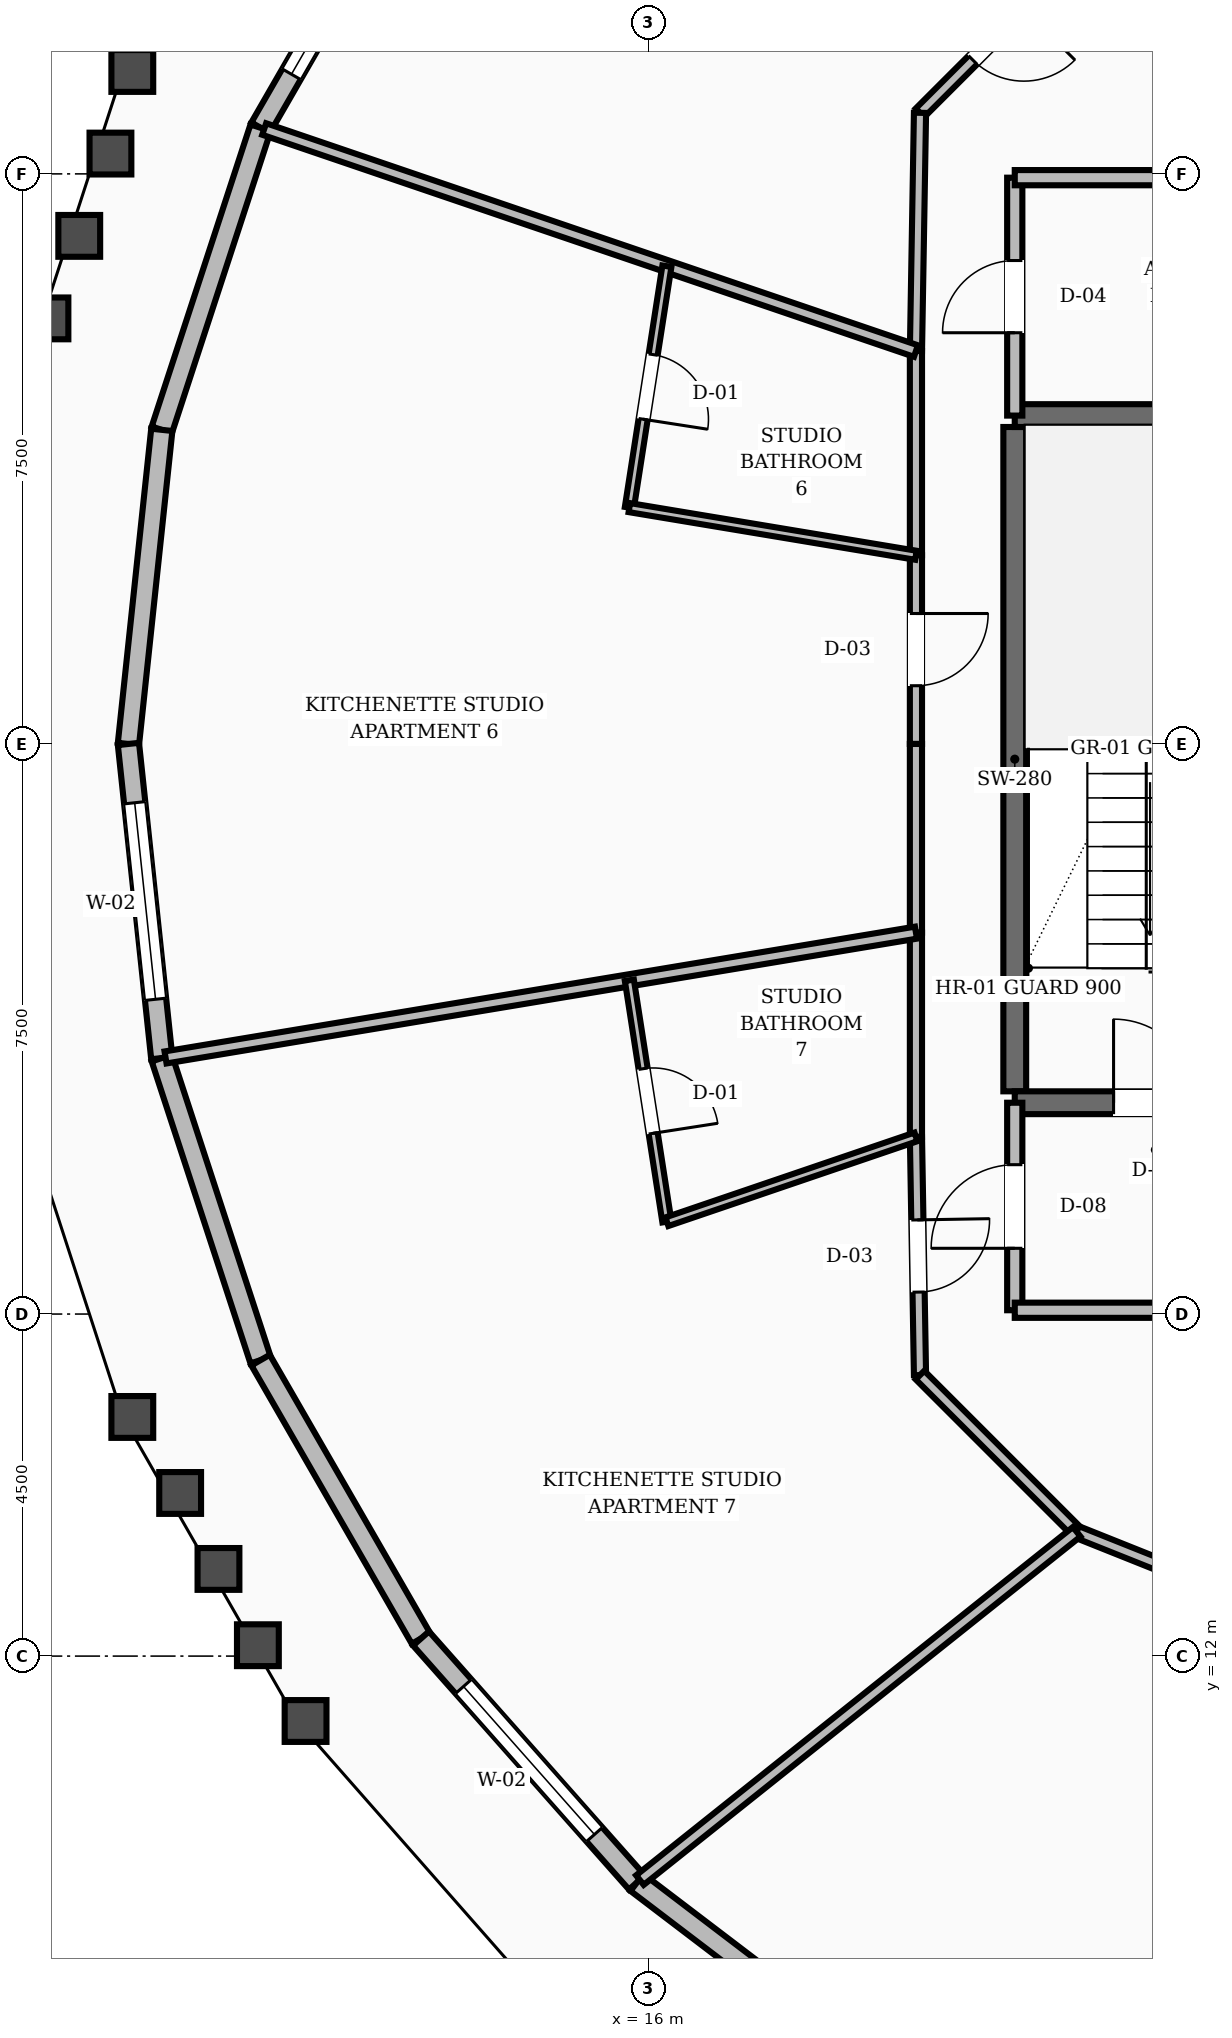
"""IFC4 building model, lengths in metres.
Left out: names, types, materials, properties, quantities, classifications, styles, units other than length and angle.
Written with IfcOpenShell. Run it as: python <this file> out.ifc"""

import sys

from ifc_helpers import new_model, si_unit, direction, frame, frame_2d, origin, place, context, subcontext, project, spatial, rectangle, extrude, element, fill, save


model = new_model("IFC4")
c1 = context("Model", 3, precision=1e-05, world=origin(), true_north=direction((0.0, 1.0)))
c2 = subcontext(c1, "Body", "Model", "MODEL_VIEW")
j1 = project(units=[si_unit("LENGTHUNIT", "METRE"), si_unit("PLANEANGLEUNIT", "RADIAN")], contexts=[c1])
p1 = place(None, origin())
s1 = spatial("IfcSite", under=j1, at=p1, CompositionType="ELEMENT")
p2 = place(p1, origin())
s2 = spatial("IfcBuilding", under=s1, at=p2, CompositionType="ELEMENT")
p3 = place(p2, frame((0.0, 0.0, 225.6)))
s3 = spatial("IfcBuildingStorey", under=s2, at=p3, CompositionType="ELEMENT", Elevation=225.6)
p4 = place(p3, frame((20.82, 19.43, 0.0), z_axis=(0.0, 0.0, 1.0), x_axis=(0.0, 1.0, 0.0)))
e1 = element("IfcWall", 1, at=p4, inside=s3, PredefinedType="SHEAR", context=c2, shape_type="SweptSolid", body=[
    extrude(rectangle(XDim=8.74, YDim=0.3, at=frame_2d((4.37, 0.0))), origin(), (0.0, 0.0, 1.0), 3.6),
])
p5 = place(p3, frame((20.82, 19.28, 0.0), z_axis=(0.0, 0.0, 1.0), x_axis=(1.0, 0.0, 0.0)))
e2 = element("IfcWall", 2, at=p5, inside=s3, PredefinedType="SHEAR", context=c2, shape_type="SweptSolid", body=[
    extrude(rectangle(XDim=3.6, YDim=0.3, at=frame_2d((1.8, 0.0))), origin(), (0.0, 0.0, 1.0), 3.6),
])
p6 = place(p5, frame((1.3, 0.0, 0.0)))
e3 = element("IfcOpeningElement", 3, at=p6, cuts=e2, PredefinedType="OPENING", context=c2, shape_type="SweptSolid", body=[
    extrude(rectangle(XDim=1.1, YDim=2.1, at=frame_2d((0.55, 1.05))), frame((0.0, 0.16, 0.0), z_axis=(0.0, -1.0, 0.0), x_axis=(1.0, 0.0, 0.0)), (0.0, 0.0, 1.0), 0.32),
])
p7 = place(p3, frame((20.82, 28.32, 0.0), z_axis=(0.0, 0.0, 1.0), x_axis=(1.0, 0.0, 0.0)))
e4 = element("IfcWall", 4, at=p7, inside=s3, PredefinedType="SHEAR", context=c2, shape_type="SweptSolid", body=[
    extrude(rectangle(XDim=3.6, YDim=0.3, at=frame_2d((1.8, 0.0))), origin(), (0.0, 0.0, 1.0), 3.6),
])
p8 = place(p3, frame((13.009, 35.768, 0.0), z_axis=(0.0, 0.0, 1.0), x_axis=(-0.499382401046, -0.866381681204, 0.0)))
e5 = element("IfcWall", 5, at=p8, inside=s3, PredefinedType="STANDARD", context=c2, shape_type="SweptSolid", body=[
    extrude(rectangle(XDim=4.227, YDim=0.28, at=frame_2d((2.113, 0.0))), origin(), (0.0, 0.0, 1.0), 2.88),
])
p9 = place(p8, frame((0.813, 0.0, 0.8)))
e6 = element("IfcOpeningElement", 6, at=p9, cuts=e5, PredefinedType="OPENING", context=c2, shape_type="SweptSolid", body=[
    extrude(rectangle(XDim=2.6, YDim=1.65, at=frame_2d((1.3, 0.825))), frame((0.0, 0.15, 0.0), z_axis=(0.0, -1.0, 0.0), x_axis=(1.0, 0.0, 0.0)), (0.0, 0.0, 1.0), 0.3),
])
p10 = place(p3, frame((10.898, 32.106, 0.0), z_axis=(0.0, 0.0, 1.0), x_axis=(-0.310844369952, -0.950460823848, 0.0)))
e7 = element("IfcWall", 7, at=p10, inside=s3, PredefinedType="STANDARD", context=c2, shape_type="SweptSolid", body=[
    extrude(rectangle(XDim=4.181, YDim=0.28, at=frame_2d((2.09, 0.0))), origin(), (0.0, 0.0, 1.0), 2.88),
])
p11 = place(p3, frame((9.598, 28.133, 0.0), z_axis=(0.0, 0.0, 1.0), x_axis=(-0.105626616613, -0.99440586174, 0.0)))
e8 = element("IfcWall", 8, at=p11, inside=s3, PredefinedType="STANDARD", context=c2, shape_type="SweptSolid", body=[
    extrude(rectangle(XDim=4.156, YDim=0.28, at=frame_2d((2.078, 0.0))), origin(), (0.0, 0.0, 1.0), 2.88),
])
p12 = place(p3, frame((9.159, 24.0, 0.0), z_axis=(0.0, 0.0, 1.0), x_axis=(0.105626616613, -0.99440586174, 0.0)))
e9 = element("IfcWall", 9, at=p12, inside=s3, PredefinedType="STANDARD", context=c2, shape_type="SweptSolid", body=[
    extrude(rectangle(XDim=4.156, YDim=0.28, at=frame_2d((2.078, 0.0))), origin(), (0.0, 0.0, 1.0), 2.88),
])
p13 = place(p12, frame((0.778, 0.0, 0.8)))
e10 = element("IfcOpeningElement", 10, at=p13, cuts=e9, PredefinedType="OPENING", context=c2, shape_type="SweptSolid", body=[
    extrude(rectangle(XDim=2.6, YDim=1.65, at=frame_2d((1.3, 0.825))), frame((0.0, 0.15, 0.0), z_axis=(0.0, -1.0, 0.0), x_axis=(1.0, 0.0, 0.0)), (0.0, 0.0, 1.0), 0.3),
])
p14 = place(p3, frame((9.598, 19.867, 0.0), z_axis=(0.0, 0.0, 1.0), x_axis=(0.310844369952, -0.950460823848, 0.0)))
e11 = element("IfcWall", 11, at=p14, inside=s3, PredefinedType="STANDARD", context=c2, shape_type="SweptSolid", body=[
    extrude(rectangle(XDim=4.181, YDim=0.28, at=frame_2d((2.09, 0.0))), origin(), (0.0, 0.0, 1.0), 2.88),
])
p15 = place(p3, frame((10.898, 15.894, 0.0), z_axis=(0.0, 0.0, 1.0), x_axis=(0.499382401046, -0.866381681204, 0.0)))
e12 = element("IfcWall", 12, at=p15, inside=s3, PredefinedType="STANDARD", context=c2, shape_type="SweptSolid", body=[
    extrude(rectangle(XDim=4.227, YDim=0.28, at=frame_2d((2.113, 0.0))), origin(), (0.0, 0.0, 1.0), 2.88),
])
p16 = place(p3, frame((13.009, 12.232, 0.0), z_axis=(0.0, 0.0, 1.0), x_axis=(0.662704142497, -0.748881312037, 0.0)))
e13 = element("IfcWall", 13, at=p16, inside=s3, PredefinedType="STANDARD", context=c2, shape_type="SweptSolid", body=[
    extrude(rectangle(XDim=4.286, YDim=0.28, at=frame_2d((2.143, 0.0))), origin(), (0.0, 0.0, 1.0), 2.88),
])
p17 = place(p16, frame((0.843, 0.0, 0.8)))
e14 = element("IfcOpeningElement", 14, at=p17, cuts=e13, PredefinedType="OPENING", context=c2, shape_type="SweptSolid", body=[
    extrude(rectangle(XDim=2.6, YDim=1.65, at=frame_2d((1.3, 0.825))), frame((0.0, 0.15, 0.0), z_axis=(0.0, -1.0, 0.0), x_axis=(1.0, 0.0, 0.0)), (0.0, 0.0, 1.0), 0.3),
])
p18 = place(p3, frame((15.849, 9.022, 0.0), z_axis=(0.0, 0.0, 1.0), x_axis=(0.795722836513, -0.605660934394, 0.0)))
e15 = element("IfcWall", 15, at=p18, inside=s3, PredefinedType="STANDARD", context=c2, shape_type="SweptSolid", body=[
    extrude(rectangle(XDim=4.349, YDim=0.28, at=frame_2d((2.175, 0.0))), origin(), (0.0, 0.0, 1.0), 2.88),
])
p19 = place(p3, frame((20.82, 16.55, 0.0), z_axis=(0.0, 0.0, 1.0), x_axis=(0.0, 1.0, 0.0)))
e16 = element("IfcWall", 16, at=p19, inside=s3, PredefinedType="SOLIDWALL", context=c2, shape_type="SweptSolid", body=[
    extrude(rectangle(XDim=2.73, YDim=0.2, at=frame_2d((1.365, 0.0))), origin(), (0.0, 0.0, 1.0), 2.87),
])
p20 = place(p19, frame((0.815, 0.0, 0.0)))
e17 = element("IfcOpeningElement", 17, at=p20, cuts=e16, PredefinedType="OPENING", context=c2, shape_type="SweptSolid", body=[
    extrude(rectangle(XDim=1.1, YDim=2.1, at=frame_2d((0.55, 1.05))), frame((0.0, 0.11, 0.0), z_axis=(0.0, -1.0, 0.0), x_axis=(1.0, 0.0, 0.0)), (0.0, 0.0, 1.0), 0.22),
])
p21 = place(p3, frame((20.82, 16.55, 0.0), z_axis=(0.0, 0.0, 1.0), x_axis=(1.0, 0.0, 0.0)))
e18 = element("IfcWall", 18, at=p21, inside=s3, PredefinedType="SOLIDWALL", context=c2, shape_type="SweptSolid", body=[
    extrude(rectangle(XDim=3.98, YDim=0.2, at=frame_2d((1.99, 0.0))), origin(), (0.0, 0.0, 1.0), 2.87),
])
p22 = place(p3, frame((20.82, 28.32, 0.0), z_axis=(0.0, 0.0, 1.0), x_axis=(0.0, 1.0, 0.0)))
e19 = element("IfcWall", 19, at=p22, inside=s3, PredefinedType="SOLIDWALL", context=c2, shape_type="SweptSolid", body=[
    extrude(rectangle(XDim=3.13, YDim=0.2, at=frame_2d((1.565, 0.0))), origin(), (0.0, 0.0, 1.0), 2.87),
])
p23 = place(p22, frame((1.09, 0.0, 0.0)))
e20 = element("IfcOpeningElement", 20, at=p23, cuts=e19, PredefinedType="OPENING", context=c2, shape_type="SweptSolid", body=[
    extrude(rectangle(XDim=0.95, YDim=2.1, at=frame_2d((0.475, 1.05))), frame((0.0, 0.11, 0.0), z_axis=(0.0, -1.0, 0.0), x_axis=(1.0, 0.0, 0.0)), (0.0, 0.0, 1.0), 0.22),
])
p24 = place(p3, frame((20.82, 31.45, 0.0), z_axis=(0.0, 0.0, 1.0), x_axis=(1.0, 0.0, 0.0)))
e21 = element("IfcWall", 21, at=p24, inside=s3, PredefinedType="SOLIDWALL", context=c2, shape_type="SweptSolid", body=[
    extrude(rectangle(XDim=3.98, YDim=0.2, at=frame_2d((1.99, 0.0))), origin(), (0.0, 0.0, 1.0), 2.87),
])
p25 = place(p3, frame((21.635, 34.365, 0.0), z_axis=(0.0, 0.0, 1.0), x_axis=(-0.707106781187, -0.707106781187, 0.0)))
e22 = element("IfcWall", 22, at=p25, inside=s3, PredefinedType="SOLIDWALL", context=c2, shape_type="SweptSolid", body=[
    extrude(rectangle(XDim=2.916, YDim=0.16, at=frame_2d((1.458, 0.0))), origin(), (0.0, 0.0, 1.0), 2.87),
])
p26 = place(p25, frame((0.983, 0.0, 0.0)))
e23 = element("IfcOpeningElement", 23, at=p26, cuts=e22, PredefinedType="OPENING", context=c2, shape_type="SweptSolid", body=[
    extrude(rectangle(XDim=0.95, YDim=2.1, at=frame_2d((0.475, 1.05))), frame((0.0, 0.09, 0.0), z_axis=(0.0, -1.0, 0.0), x_axis=(1.0, 0.0, 0.0)), (0.0, 0.0, 1.0), 0.18),
])
p27 = place(p3, frame((19.573, 32.303, 0.0), z_axis=(0.0, 0.0, 1.0), x_axis=(-0.016981035134, -0.999855811828, 0.0)))
e24 = element("IfcWall", 24, at=p27, inside=s3, PredefinedType="SOLIDWALL", context=c2, shape_type="SweptSolid", body=[
    extrude(rectangle(XDim=3.134, YDim=0.16, at=frame_2d((1.567, 0.0))), origin(), (0.0, 0.0, 1.0), 2.87),
])
p28 = place(p3, frame((19.52, 29.169, 0.0), z_axis=(0.0, 0.0, 1.0), x_axis=(0.0, -1.0, 0.0)))
e25 = element("IfcWall", 25, at=p28, inside=s3, PredefinedType="SOLIDWALL", context=c2, shape_type="SweptSolid", body=[
    extrude(rectangle(XDim=2.687, YDim=0.16, at=frame_2d((1.344, 0.0))), origin(), (0.0, 0.0, 1.0), 2.87),
])
p29 = place(p3, frame((19.52, 26.482, 0.0), z_axis=(0.0, 0.0, 1.0), x_axis=(0.0, -1.0, 0.0)))
e26 = element("IfcWall", 26, at=p29, inside=s3, PredefinedType="SOLIDWALL", context=c2, shape_type="SweptSolid", body=[
    extrude(rectangle(XDim=2.482, YDim=0.16, at=frame_2d((1.241, 0.0))), origin(), (0.0, 0.0, 1.0), 2.87),
])
p30 = place(p29, frame((0.766, 0.0, 0.0)))
e27 = element("IfcOpeningElement", 27, at=p30, cuts=e26, PredefinedType="OPENING", context=c2, shape_type="SweptSolid", body=[
    extrude(rectangle(XDim=0.95, YDim=2.1, at=frame_2d((0.475, 1.05))), frame((0.0, 0.09, 0.0), z_axis=(0.0, -1.0, 0.0), x_axis=(1.0, 0.0, 0.0)), (0.0, 0.0, 1.0), 0.18),
])
p31 = place(p3, frame((19.52, 24.0, 0.0), z_axis=(0.0, 0.0, 1.0), x_axis=(0.0, -1.0, 0.0)))
e28 = element("IfcWall", 28, at=p31, inside=s3, PredefinedType="SOLIDWALL", context=c2, shape_type="SweptSolid", body=[
    extrude(rectangle(XDim=2.482, YDim=0.16, at=frame_2d((1.241, 0.0))), origin(), (0.0, 0.0, 1.0), 2.87),
])
p32 = place(p3, frame((19.52, 21.518, 0.0), z_axis=(0.0, 0.0, 1.0), x_axis=(0.0, -1.0, 0.0)))
e29 = element("IfcWall", 29, at=p32, inside=s3, PredefinedType="SOLIDWALL", context=c2, shape_type="SweptSolid", body=[
    extrude(rectangle(XDim=2.687, YDim=0.16, at=frame_2d((1.344, 0.0))), origin(), (0.0, 0.0, 1.0), 2.87),
])
p33 = place(p3, frame((19.52, 18.831, 0.0), z_axis=(0.0, 0.0, 1.0), x_axis=(0.016981035134, -0.999855811828, 0.0)))
e30 = element("IfcWall", 30, at=p33, inside=s3, PredefinedType="SOLIDWALL", context=c2, shape_type="SweptSolid", body=[
    extrude(rectangle(XDim=3.134, YDim=0.16, at=frame_2d((1.567, 0.0))), origin(), (0.0, 0.0, 1.0), 2.87),
])
p34 = place(p33, frame((1.092, 0.0, 0.0)))
e31 = element("IfcOpeningElement", 31, at=p34, cuts=e30, PredefinedType="OPENING", context=c2, shape_type="SweptSolid", body=[
    extrude(rectangle(XDim=0.95, YDim=2.1, at=frame_2d((0.475, 1.05))), frame((0.0, 0.09, 0.0), z_axis=(0.0, -1.0, 0.0), x_axis=(1.0, 0.0, 0.0)), (0.0, 0.0, 1.0), 0.18),
])
p35 = place(p3, frame((19.573, 15.697, 0.0), z_axis=(0.0, 0.0, 1.0), x_axis=(0.707106781187, -0.707106781187, 0.0)))
e32 = element("IfcWall", 32, at=p35, inside=s3, PredefinedType="SOLIDWALL", context=c2, shape_type="SweptSolid", body=[
    extrude(rectangle(XDim=2.916, YDim=0.16, at=frame_2d((1.458, 0.0))), origin(), (0.0, 0.0, 1.0), 2.87),
])
p36 = place(p3, frame((21.635, 13.635, 0.0), z_axis=(0.0, 0.0, 1.0), x_axis=(0.92856882165, -0.371160266542, 0.0)))
e33 = element("IfcWall", 33, at=p36, inside=s3, PredefinedType="SOLIDWALL", context=c2, shape_type="SweptSolid", body=[
    extrude(rectangle(XDim=2.923, YDim=0.16, at=frame_2d((1.461, 0.0))), origin(), (0.0, 0.0, 1.0), 2.87),
])
p37 = place(p3, frame((19.52, 29.169, 0.0), z_axis=(0.0, 0.0, 1.0), x_axis=(-0.946595836361, 0.322422583862, 0.0)))
e34 = element("IfcWall", 34, at=p37, inside=s3, PredefinedType="SOLIDWALL", context=c2, shape_type="SweptSolid", body=[
    extrude(rectangle(XDim=9.058, YDim=0.16, at=frame_2d((4.529, 0.0))), origin(), (0.0, 0.0, 1.0), 2.87),
])
p38 = place(p3, frame((16.244, 30.285, 0.0), z_axis=(0.0, 0.0, 1.0), x_axis=(-0.153660860634, -0.988123646063, 0.0)))
e35 = element("IfcWall", 35, at=p38, inside=s3, PredefinedType="PARTITIONING", context=c2, shape_type="SweptSolid", body=[
    extrude(rectangle(XDim=3.214, YDim=0.12, at=frame_2d((1.607, 0.0))), origin(), (0.0, 0.0, 1.0), 2.87),
])
p39 = place(p38, frame((1.177, 0.0, 0.0)))
e36 = element("IfcOpeningElement", 36, at=p39, cuts=e35, PredefinedType="OPENING", context=c2, shape_type="SweptSolid", body=[
    extrude(rectangle(XDim=0.86, YDim=2.1, at=frame_2d((0.43, 1.05))), frame((0.0, 0.07, 0.0), z_axis=(0.0, -1.0, 0.0), x_axis=(1.0, 0.0, 0.0)), (0.0, 0.0, 1.0), 0.14),
])
p40 = place(p3, frame((19.52, 26.482, 0.0), z_axis=(0.0, 0.0, 1.0), x_axis=(-0.986454281504, 0.164036430415, 0.0)))
e37 = element("IfcWall", 37, at=p40, inside=s3, PredefinedType="PARTITIONING", context=c2, shape_type="SweptSolid", body=[
    extrude(rectangle(XDim=3.822, YDim=0.12, at=frame_2d((1.911, 0.0))), origin(), (0.0, 0.0, 1.0), 2.87),
])
p41 = place(p3, frame((19.52, 21.518, 0.0), z_axis=(0.0, 0.0, 1.0), x_axis=(-0.986451224461, -0.164054813277, 0.0)))
e38 = element("IfcWall", 38, at=p41, inside=s3, PredefinedType="SOLIDWALL", context=c2, shape_type="SweptSolid", body=[
    extrude(rectangle(XDim=10.008, YDim=0.16, at=frame_2d((5.004, 0.0))), origin(), (0.0, 0.0, 1.0), 2.87),
])
p42 = place(p3, frame((15.75, 20.891, 0.0), z_axis=(0.0, 0.0, 1.0), x_axis=(0.153660860634, -0.988123646063, 0.0)))
e39 = element("IfcWall", 39, at=p42, inside=s3, PredefinedType="PARTITIONING", context=c2, shape_type="SweptSolid", body=[
    extrude(rectangle(XDim=3.214, YDim=0.12, at=frame_2d((1.607, 0.0))), origin(), (0.0, 0.0, 1.0), 2.87),
])
p43 = place(p42, frame((1.177, 0.0, 0.0)))
e40 = element("IfcOpeningElement", 40, at=p43, cuts=e39, PredefinedType="OPENING", context=c2, shape_type="SweptSolid", body=[
    extrude(rectangle(XDim=0.86, YDim=2.1, at=frame_2d((0.43, 1.05))), frame((0.0, 0.07, 0.0), z_axis=(0.0, -1.0, 0.0), x_axis=(1.0, 0.0, 0.0)), (0.0, 0.0, 1.0), 0.14),
])
p44 = place(p3, frame((19.52, 18.831, 0.0), z_axis=(0.0, 0.0, 1.0), x_axis=(-0.946596325492, -0.322421147826, 0.0)))
e41 = element("IfcWall", 41, at=p44, inside=s3, PredefinedType="PARTITIONING", context=c2, shape_type="SweptSolid", body=[
    extrude(rectangle(XDim=3.461, YDim=0.12, at=frame_2d((1.73, 0.0))), origin(), (0.0, 0.0, 1.0), 2.87),
])
p45 = place(p3, frame((21.635, 13.635, 0.0), z_axis=(0.0, 0.0, 1.0), x_axis=(-0.781878901848, -0.623430335198, 0.0)))
e42 = element("IfcWall", 42, at=p45, inside=s3, PredefinedType="SOLIDWALL", context=c2, shape_type="SweptSolid", body=[
    extrude(rectangle(XDim=7.35, YDim=0.16, at=frame_2d((3.675, 0.0))), origin(), (0.0, 0.0, 1.0), 2.87),
])
p46 = place(p9, origin())
e43 = element("IfcWindow", 43, at=p46, inside=s3, PartitioningType="SINGLE_PANEL", PredefinedType="WINDOW", context=c2, shape_type="SweptSolid", body=[
    extrude(rectangle(XDim=2.6, YDim=1.65, at=frame_2d((1.3, 0.825))), frame((0.0, 0.03, 0.0), z_axis=(0.0, -1.0, 0.0), x_axis=(1.0, 0.0, 0.0)), (0.0, 0.0, 1.0), 0.06),
])
fill(e6, e43)
p47 = place(p13, origin())
e44 = element("IfcWindow", 44, at=p47, inside=s3, PartitioningType="SINGLE_PANEL", PredefinedType="WINDOW", context=c2, shape_type="SweptSolid", body=[
    extrude(rectangle(XDim=2.6, YDim=1.65, at=frame_2d((1.3, 0.825))), frame((0.0, 0.03, 0.0), z_axis=(0.0, -1.0, 0.0), x_axis=(1.0, 0.0, 0.0)), (0.0, 0.0, 1.0), 0.06),
])
fill(e10, e44)
p48 = place(p17, origin())
e45 = element("IfcWindow", 45, at=p48, inside=s3, PartitioningType="SINGLE_PANEL", PredefinedType="WINDOW", context=c2, shape_type="SweptSolid", body=[
    extrude(rectangle(XDim=2.6, YDim=1.65, at=frame_2d((1.3, 0.825))), frame((0.0, 0.03, 0.0), z_axis=(0.0, -1.0, 0.0), x_axis=(1.0, 0.0, 0.0)), (0.0, 0.0, 1.0), 0.06),
])
fill(e14, e45)
p49 = place(p6, origin())
e46 = element("IfcDoor", 46, at=p49, inside=s3, OperationType="SINGLE_SWING_LEFT", PredefinedType="DOOR", context=c2, shape_type="SweptSolid", body=[
    extrude(rectangle(XDim=1.1, YDim=2.1, at=frame_2d((0.55, 1.05))), frame((0.0, 0.025, 0.0), z_axis=(0.0, -1.0, 0.0), x_axis=(1.0, 0.0, 0.0)), (0.0, 0.0, 1.0), 0.05),
])
fill(e3, e46)
p50 = place(p20, origin())
e47 = element("IfcDoor", 47, at=p50, inside=s3, OperationType="SINGLE_SWING_LEFT", PredefinedType="DOOR", context=c2, shape_type="SweptSolid", body=[
    extrude(rectangle(XDim=1.1, YDim=2.1, at=frame_2d((0.55, 1.05))), frame((0.0, 0.025, 0.0), z_axis=(0.0, -1.0, 0.0), x_axis=(1.0, 0.0, 0.0)), (0.0, 0.0, 1.0), 0.05),
])
fill(e17, e47)
p51 = place(p23, origin())
e48 = element("IfcDoor", 48, at=p51, inside=s3, OperationType="SINGLE_SWING_LEFT", PredefinedType="DOOR", context=c2, shape_type="SweptSolid", body=[
    extrude(rectangle(XDim=0.95, YDim=2.1, at=frame_2d((0.475, 1.05))), frame((0.0, 0.025, 0.0), z_axis=(0.0, -1.0, 0.0), x_axis=(1.0, 0.0, 0.0)), (0.0, 0.0, 1.0), 0.05),
])
fill(e20, e48)
p52 = place(p26, origin())
e49 = element("IfcDoor", 49, at=p52, inside=s3, OperationType="SINGLE_SWING_LEFT", PredefinedType="DOOR", context=c2, shape_type="SweptSolid", body=[
    extrude(rectangle(XDim=0.95, YDim=2.1, at=frame_2d((0.475, 1.05))), frame((0.0, 0.025, 0.0), z_axis=(0.0, -1.0, 0.0), x_axis=(1.0, 0.0, 0.0)), (0.0, 0.0, 1.0), 0.05),
])
fill(e23, e49)
p53 = place(p39, origin())
e50 = element("IfcDoor", 50, at=p53, inside=s3, OperationType="SINGLE_SWING_RIGHT", PredefinedType="DOOR", context=c2, shape_type="SweptSolid", body=[
    extrude(rectangle(XDim=0.86, YDim=2.1, at=frame_2d((0.43, 1.05))), frame((0.0, 0.025, 0.0), z_axis=(0.0, -1.0, 0.0), x_axis=(1.0, 0.0, 0.0)), (0.0, 0.0, 1.0), 0.05),
])
fill(e36, e50)
p54 = place(p30, origin())
e51 = element("IfcDoor", 51, at=p54, inside=s3, OperationType="SINGLE_SWING_LEFT", PredefinedType="DOOR", context=c2, shape_type="SweptSolid", body=[
    extrude(rectangle(XDim=0.95, YDim=2.1, at=frame_2d((0.475, 1.05))), frame((0.0, 0.025, 0.0), z_axis=(0.0, -1.0, 0.0), x_axis=(1.0, 0.0, 0.0)), (0.0, 0.0, 1.0), 0.05),
])
fill(e27, e51)
p55 = place(p43, origin())
e52 = element("IfcDoor", 52, at=p55, inside=s3, OperationType="SINGLE_SWING_RIGHT", PredefinedType="DOOR", context=c2, shape_type="SweptSolid", body=[
    extrude(rectangle(XDim=0.86, YDim=2.1, at=frame_2d((0.43, 1.05))), frame((0.0, 0.025, 0.0), z_axis=(0.0, -1.0, 0.0), x_axis=(1.0, 0.0, 0.0)), (0.0, 0.0, 1.0), 0.05),
])
fill(e40, e52)
p56 = place(p34, origin())
e53 = element("IfcDoor", 53, at=p56, inside=s3, OperationType="SINGLE_SWING_LEFT", PredefinedType="DOOR", context=c2, shape_type="SweptSolid", body=[
    extrude(rectangle(XDim=0.95, YDim=2.1, at=frame_2d((0.475, 1.05))), frame((0.0, 0.025, 0.0), z_axis=(0.0, -1.0, 0.0), x_axis=(1.0, 0.0, 0.0)), (0.0, 0.0, 1.0), 0.05),
])
fill(e31, e53)
save(model, sys.argv[1])
